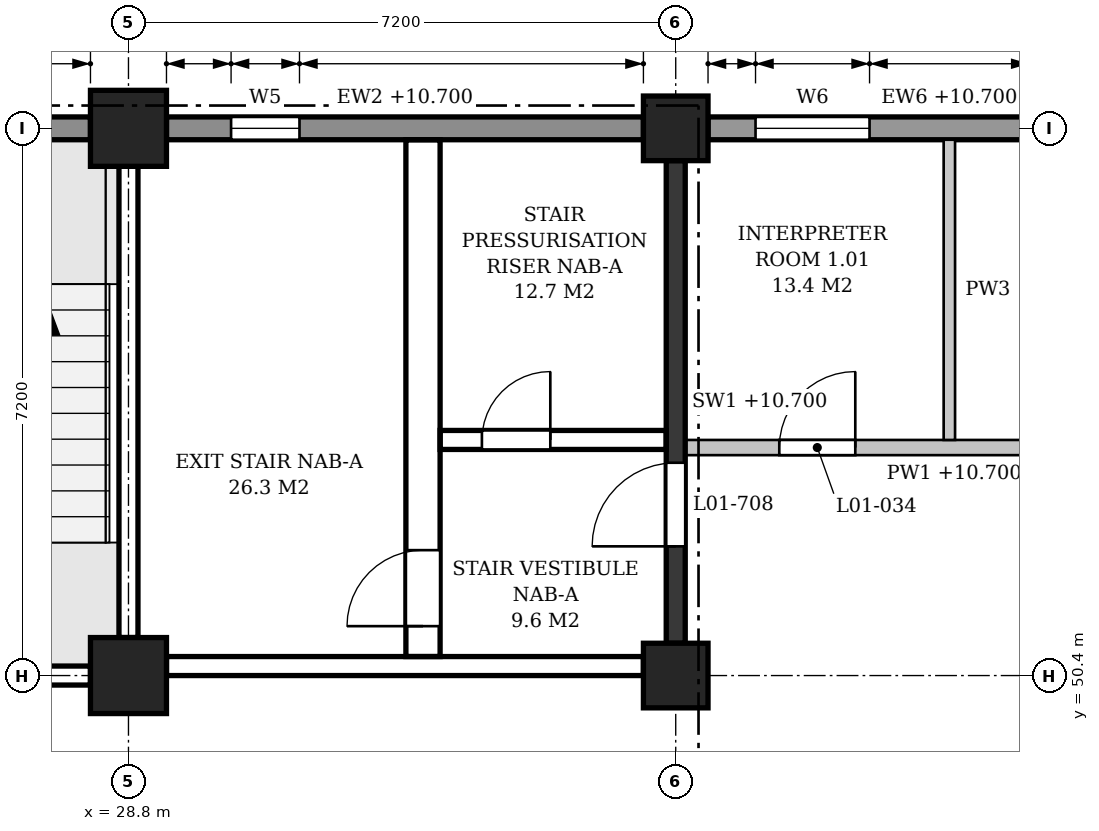
"""IFC4 building model, lengths in metres.
Left out: names, types, materials, properties, quantities, classifications, styles, units other than length and angle.
Written with IfcOpenShell. Run it as: python <this file> out.ifc"""

import sys

from ifc_helpers import new_model, si_unit, direction, frame, frame_2d, origin, origin_2d, place, context, subcontext, project, spatial, polyline, rectangle, outline, extrude, element, fill, save


model = new_model("IFC4")
c1 = context("Model", 3, precision=1e-05, world=origin(), true_north=direction((0.0, 1.0)))
c2 = subcontext(c1, "Body", "Model", "MODEL_VIEW")
j1 = project(units=[si_unit("LENGTHUNIT", "METRE"), si_unit("PLANEANGLEUNIT", "RADIAN")], contexts=[c1])
p1 = place(None, origin())
s1 = spatial("IfcSite", under=j1, at=p1, CompositionType="ELEMENT")
p2 = place(p1, origin())
s2 = spatial("IfcBuilding", under=s1, at=p2, CompositionType="ELEMENT")
p3 = place(p2, frame((0.0, 0.0, 6.0)))
s3 = spatial("IfcBuildingStorey", under=s2, at=p3, CompositionType="ELEMENT", Elevation=6.0)
for number, where, z_axis, x_axis in (
    (1, (28.8, 50.4, 0.0), (0.0, 0.0, 1.0), (1.0, 0.0, 0.0)),
    (2, (28.8, 57.6, 0.0), (0.0, 0.0, 1.0), (1.0, 0.0, 0.0)),
):
    element("IfcColumn", number, at=place(p3, frame(where, z_axis=z_axis, x_axis=x_axis)), inside=s3, PredefinedType="COLUMN", context=c2, shape_type="SweptSolid", body=[
        extrude(rectangle(XDim=1.0, YDim=1.0, at=origin_2d()), origin(), (0.0, 0.0, 1.0), 5.4),
    ])
for number, where, z_axis, x_axis in (
    (3, (36.0, 50.4, 0.0), (0.0, 0.0, 1.0), (1.0, 0.0, 0.0)),
    (4, (36.0, 57.6, 0.0), (0.0, 0.0, 1.0), (1.0, 0.0, 0.0)),
):
    element("IfcColumn", number, at=place(p3, frame(where, z_axis=z_axis, x_axis=x_axis)), inside=s3, PredefinedType="COLUMN", context=c2, shape_type="SweptSolid", body=[
        extrude(rectangle(XDim=0.85, YDim=0.85, at=origin_2d()), origin(), (0.0, 0.0, 1.0), 5.4),
    ])
p4 = place(p3, frame((42.775, 57.6, 0.0), z_axis=(0.0, 0.0, 1.0), x_axis=(-1.0, 0.0, 0.0)))
e5 = element("IfcWall", 5, at=p4, inside=s3, PredefinedType="STANDARD", context=c2, shape_type="SweptSolid", body=[
    extrude(rectangle(XDim=6.35, YDim=0.3, at=frame_2d((3.175, 0.0))), origin(), (0.0, 0.0, 1.0), 4.7),
])
p5 = place(p4, frame((0.625, 0.0, 0.9)))
e6 = element("IfcOpeningElement", 6, at=p5, cuts=e5, PredefinedType="OPENING", context=c2, shape_type="SweptSolid", body=[
    extrude(outline(polyline([(0.0, 0.0), (1.5, 0.0), (1.5, 2.85), (0.75, 3.6), (0.0, 2.85), (0.0, 0.0)])), frame((0.0, 0.16, 0.0), z_axis=(0.0, -1.0, 0.0), x_axis=(1.0, 0.0, 0.0)), (0.0, 0.0, 1.0), 0.32),
])
p6 = place(p4, frame((4.225, 0.0, 0.9)))
e7 = element("IfcOpeningElement", 7, at=p6, cuts=e5, PredefinedType="OPENING", context=c2, shape_type="SweptSolid", body=[
    extrude(outline(polyline([(0.0, 0.0), (1.5, 0.0), (1.5, 2.85), (0.75, 3.6), (0.0, 2.85), (0.0, 0.0)])), frame((0.0, 0.16, 0.0), z_axis=(0.0, -1.0, 0.0), x_axis=(1.0, 0.0, 0.0)), (0.0, 0.0, 1.0), 0.32),
])
p7 = place(p3, frame((35.575, 57.6, 0.0), z_axis=(0.0, 0.0, 1.0), x_axis=(-1.0, 0.0, 0.0)))
e8 = element("IfcWall", 8, at=p7, inside=s3, PredefinedType="STANDARD", context=c2, shape_type="SweptSolid", body=[
    extrude(rectangle(XDim=6.275, YDim=0.3, at=frame_2d((3.137, 0.0))), origin(), (0.0, 0.0, 1.0), 4.7),
])
p8 = place(p7, frame((4.525, 0.0, 0.9)))
e9 = element("IfcOpeningElement", 9, at=p8, cuts=e8, PredefinedType="OPENING", context=c2, shape_type="SweptSolid", body=[
    extrude(outline(polyline([(0.0, 0.0), (0.9, 0.0), (0.9, 3.15), (0.45, 3.6), (0.0, 3.15), (0.0, 0.0)])), frame((0.0, 0.16, 0.0), z_axis=(0.0, -1.0, 0.0), x_axis=(1.0, 0.0, 0.0)), (0.0, 0.0, 1.0), 0.32),
])
p9 = place(p3, frame((28.3, 57.6, 0.0), z_axis=(0.0, 0.0, 1.0), x_axis=(-1.0, 0.0, 0.0)))
e10 = element("IfcWall", 10, at=p9, inside=s3, PredefinedType="STANDARD", context=c2, shape_type="SweptSolid", body=[
    extrude(rectangle(XDim=6.2, YDim=0.3, at=frame_2d((3.1, 0.0))), origin(), (0.0, 0.0, 1.0), 4.55),
])
p10 = place(p9, frame((0.85, 0.0, 0.9)))
e11 = element("IfcOpeningElement", 11, at=p10, cuts=e10, PredefinedType="OPENING", context=c2, shape_type="SweptSolid", body=[
    extrude(outline(polyline([(0.0, 0.0), (0.9, 0.0), (0.9, 3.15), (0.45, 3.6), (0.0, 3.15), (0.0, 0.0)])), frame((0.0, 0.16, 0.0), z_axis=(0.0, -1.0, 0.0), x_axis=(1.0, 0.0, 0.0)), (0.0, 0.0, 1.0), 0.32),
])
p11 = place(p3, frame((29.3, 50.525, 0.0), z_axis=(0.0, 0.0, 1.0), x_axis=(1.0, 0.0, 0.0)))
e12 = element("IfcWall", 12, at=p11, inside=s3, PredefinedType="SHEAR", context=c2, shape_type="SweptSolid", body=[
    extrude(rectangle(XDim=6.275, YDim=0.25, at=frame_2d((3.137, 0.0))), origin(), (0.0, 0.0, 1.0), 4.7),
])
p12 = place(p3, frame((28.8, 50.9, -0.25), z_axis=(0.0, 0.0, 1.0), x_axis=(0.0, 1.0, 0.0)))
e13 = element("IfcWall", 13, at=p12, inside=s3, PredefinedType="SHEAR", context=c2, shape_type="SweptSolid", body=[
    extrude(rectangle(XDim=6.2, YDim=0.25, at=frame_2d((3.1, 0.0))), origin(), (0.0, 0.0, 1.0), 4.8),
])
p13 = place(p3, frame((36.0, 50.825, 0.0), z_axis=(0.0, 0.0, 1.0), x_axis=(0.0, 1.0, 0.0)))
e14 = element("IfcWall", 14, at=p13, inside=s3, PredefinedType="SHEAR", context=c2, shape_type="SweptSolid", body=[
    extrude(rectangle(XDim=6.35, YDim=0.25, at=frame_2d((3.175, 0.0))), origin(), (0.0, 0.0, 1.0), 4.7),
])
p14 = place(p13, frame((1.275, 0.0, 0.0)))
e15 = element("IfcOpeningElement", 15, at=p14, cuts=e14, PredefinedType="OPENING", context=c2, shape_type="SweptSolid", body=[
    extrude(rectangle(XDim=1.1, YDim=2.1, at=frame_2d((0.55, 1.05))), frame((0.0, 0.135, 0.0), z_axis=(0.0, -1.0, 0.0), x_axis=(1.0, 0.0, 0.0)), (0.0, 0.0, 1.0), 0.27),
])
p15 = place(p3, frame((32.675, 50.65, 0.0), z_axis=(0.0, 0.0, 1.0), x_axis=(0.0, 1.0, 0.0)))
e16 = element("IfcWall", 16, at=p15, inside=s3, PredefinedType="SHEAR", context=c2, shape_type="SweptSolid", body=[
    extrude(rectangle(XDim=6.8, YDim=0.45, at=frame_2d((3.4, 0.0))), origin(), (0.0, 0.0, 1.0), 4.7),
])
p16 = place(p15, frame((0.4, 0.0, 0.0)))
e17 = element("IfcOpeningElement", 17, at=p16, cuts=e16, PredefinedType="OPENING", context=c2, shape_type="SweptSolid", body=[
    extrude(rectangle(XDim=1.0, YDim=2.1, at=frame_2d((0.5, 1.05))), frame((0.0, 0.235, 0.0), z_axis=(0.0, -1.0, 0.0), x_axis=(1.0, 0.0, 0.0)), (0.0, 0.0, 1.0), 0.47),
])
p17 = place(p3, frame((32.9, 53.5, 0.0), z_axis=(0.0, 0.0, 1.0), x_axis=(1.0, 0.0, 0.0)))
e18 = element("IfcWall", 18, at=p17, inside=s3, PredefinedType="SHEAR", context=c2, shape_type="SweptSolid", body=[
    extrude(rectangle(XDim=2.975, YDim=0.25, at=frame_2d((1.488, 0.0))), origin(), (0.0, 0.0, 1.0), 4.7),
])
p18 = place(p17, frame((0.55, 0.0, 0.0)))
e19 = element("IfcOpeningElement", 19, at=p18, cuts=e18, PredefinedType="OPENING", context=c2, shape_type="SweptSolid", body=[
    extrude(rectangle(XDim=0.9, YDim=2.1, at=frame_2d((0.45, 1.05))), frame((0.0, 0.135, 0.0), z_axis=(0.0, -1.0, 0.0), x_axis=(1.0, 0.0, 0.0)), (0.0, 0.0, 1.0), 0.27),
])
p19 = place(p3, frame((22.1, 50.4, 0.0), z_axis=(0.0, 0.0, 1.0), x_axis=(1.0, 0.0, 0.0)))
e20 = element("IfcWall", 20, at=p19, inside=s3, PredefinedType="SHEAR", context=c2, shape_type="SweptSolid", body=[
    extrude(rectangle(XDim=6.2, YDim=0.25, at=frame_2d((3.1, 0.0))), origin(), (0.0, 0.0, 1.0), 4.4),
])
p20 = place(p19, frame((0.35, 0.0, 0.0)))
e21 = element("IfcOpeningElement", 21, at=p20, cuts=e20, PredefinedType="OPENING", context=c2, shape_type="SweptSolid", body=[
    extrude(rectangle(XDim=1.1, YDim=2.1, at=frame_2d((0.55, 1.05))), frame((0.0, 0.135, 0.0), z_axis=(0.0, -1.0, 0.0), x_axis=(1.0, 0.0, 0.0)), (0.0, 0.0, 1.0), 0.27),
])
p21 = place(p2, origin())
s4 = spatial("IfcBuildingStorey", under=s2, at=p21, CompositionType="ELEMENT", Elevation=0.0)
p22 = place(p21, frame((29.3, 50.2, 0.0), z_axis=(0.0, 0.0, 1.0), x_axis=(1.0, 0.0, 0.0)))
e22 = element("IfcWall", 22, at=p22, inside=s4, PredefinedType="SOLIDWALL", context=c2, shape_type="SweptSolid", body=[
    extrude(rectangle(XDim=6.275, YDim=0.4, at=frame_2d((3.137, 0.0))), origin(), (0.0, 0.0, 1.0), 10.7),
])
p23 = place(p21, frame((36.425, 50.2, 0.0), z_axis=(0.0, 0.0, 1.0), x_axis=(1.0, 0.0, 0.0)))
e23 = element("IfcWall", 23, at=p23, inside=s4, PredefinedType="SOLIDWALL", context=c2, shape_type="SweptSolid", body=[
    extrude(rectangle(XDim=6.35, YDim=0.4, at=frame_2d((3.175, 0.0))), origin(), (0.0, 0.0, 1.0), 10.7),
])
p24 = place(p21, frame((29.0, 43.7, 0.0), z_axis=(0.0, 0.0, 1.0), x_axis=(0.0, 1.0, 0.0)))
e24 = element("IfcWall", 24, at=p24, inside=s4, PredefinedType="SOLIDWALL", context=c2, shape_type="SweptSolid", body=[
    extrude(rectangle(XDim=6.2, YDim=0.4, at=frame_2d((3.1, 0.0))), origin(), (0.0, 0.0, 1.0), 10.55),
])
p25 = place(p3, frame((36.125, 53.4, 0.0), z_axis=(0.0, 0.0, 1.0), x_axis=(1.0, 0.0, 0.0)))
e25 = element("IfcWall", 25, at=p25, inside=s3, PredefinedType="PARTITIONING", context=c2, shape_type="SweptSolid", body=[
    extrude(rectangle(XDim=7.075, YDim=0.2, at=frame_2d((3.538, 0.0))), origin(), (0.0, 0.0, 1.0), 4.7),
])
p26 = place(p25, frame((1.238, 0.0, 0.0)))
e26 = element("IfcOpeningElement", 26, at=p26, cuts=e25, PredefinedType="OPENING", context=c2, shape_type="SweptSolid", body=[
    extrude(rectangle(XDim=1.0, YDim=2.1, at=frame_2d((0.5, 1.05))), frame((0.0, 0.11, 0.0), z_axis=(0.0, -1.0, 0.0), x_axis=(1.0, 0.0, 0.0)), (0.0, 0.0, 1.0), 0.22),
])
p27 = place(p3, frame((39.6, 53.5, 0.0), z_axis=(0.0, 0.0, 1.0), x_axis=(0.0, 1.0, 0.0)))
e27 = element("IfcWall", 27, at=p27, inside=s3, PredefinedType="PARTITIONING", context=c2, shape_type="SweptSolid", body=[
    extrude(rectangle(XDim=3.95, YDim=0.15, at=frame_2d((1.975, 0.0))), origin(), (0.0, 0.0, 1.0), 4.4),
])
p28 = place(p6, origin())
e28 = element("IfcWindow", 28, at=p28, inside=s3, PartitioningType="SINGLE_PANEL", PredefinedType="WINDOW", context=c2, shape_type="SweptSolid", body=[
    extrude(outline(polyline([(0.0, 0.0), (1.5, 0.0), (1.5, 2.85), (0.75, 3.6), (0.0, 2.85), (0.0, 0.0)])), frame((0.0, 0.03, 0.0), z_axis=(0.0, -1.0, 0.0), x_axis=(1.0, 0.0, 0.0)), (0.0, 0.0, 1.0), 0.06),
])
fill(e7, e28)
p29 = place(p8, origin())
e29 = element("IfcWindow", 29, at=p29, inside=s3, PartitioningType="SINGLE_PANEL", PredefinedType="WINDOW", context=c2, shape_type="SweptSolid", body=[
    extrude(outline(polyline([(0.0, 0.0), (0.9, 0.0), (0.9, 3.15), (0.45, 3.6), (0.0, 3.15), (0.0, 0.0)])), frame((0.0, 0.03, 0.0), z_axis=(0.0, -1.0, 0.0), x_axis=(1.0, 0.0, 0.0)), (0.0, 0.0, 1.0), 0.06),
])
fill(e9, e29)
p30 = place(p16, origin())
e30 = element("IfcDoor", 30, at=p30, inside=s3, OperationType="SINGLE_SWING_LEFT", PredefinedType="DOOR", context=c2, shape_type="SweptSolid", body=[
    extrude(rectangle(XDim=1.0, YDim=2.1, at=frame_2d((0.5, 1.05))), frame((0.0, 0.025, 0.0), z_axis=(0.0, -1.0, 0.0), x_axis=(1.0, 0.0, 0.0)), (0.0, 0.0, 1.0), 0.05),
])
fill(e17, e30)
p31 = place(p14, origin())
e31 = element("IfcDoor", 31, at=p31, inside=s3, OperationType="SINGLE_SWING_LEFT", PredefinedType="DOOR", context=c2, shape_type="SweptSolid", body=[
    extrude(rectangle(XDim=1.1, YDim=2.1, at=frame_2d((0.55, 1.05))), frame((0.0, 0.025, 0.0), z_axis=(0.0, -1.0, 0.0), x_axis=(1.0, 0.0, 0.0)), (0.0, 0.0, 1.0), 0.05),
])
fill(e15, e31)
p32 = place(p18, origin())
e32 = element("IfcDoor", 32, at=p32, inside=s3, OperationType="SINGLE_SWING_RIGHT", PredefinedType="DOOR", context=c2, shape_type="SweptSolid", body=[
    extrude(rectangle(XDim=0.9, YDim=2.1, at=frame_2d((0.45, 1.05))), frame((0.0, 0.025, 0.0), z_axis=(0.0, -1.0, 0.0), x_axis=(1.0, 0.0, 0.0)), (0.0, 0.0, 1.0), 0.05),
])
fill(e19, e32)
p33 = place(p26, origin())
e33 = element("IfcDoor", 33, at=p33, inside=s3, OperationType="SINGLE_SWING_RIGHT", PredefinedType="DOOR", context=c2, shape_type="SweptSolid", body=[
    extrude(rectangle(XDim=1.0, YDim=2.1, at=frame_2d((0.5, 1.05))), frame((0.0, 0.025, 0.0), z_axis=(0.0, -1.0, 0.0), x_axis=(1.0, 0.0, 0.0)), (0.0, 0.0, 1.0), 0.05),
])
fill(e26, e33)
save(model, sys.argv[1])
